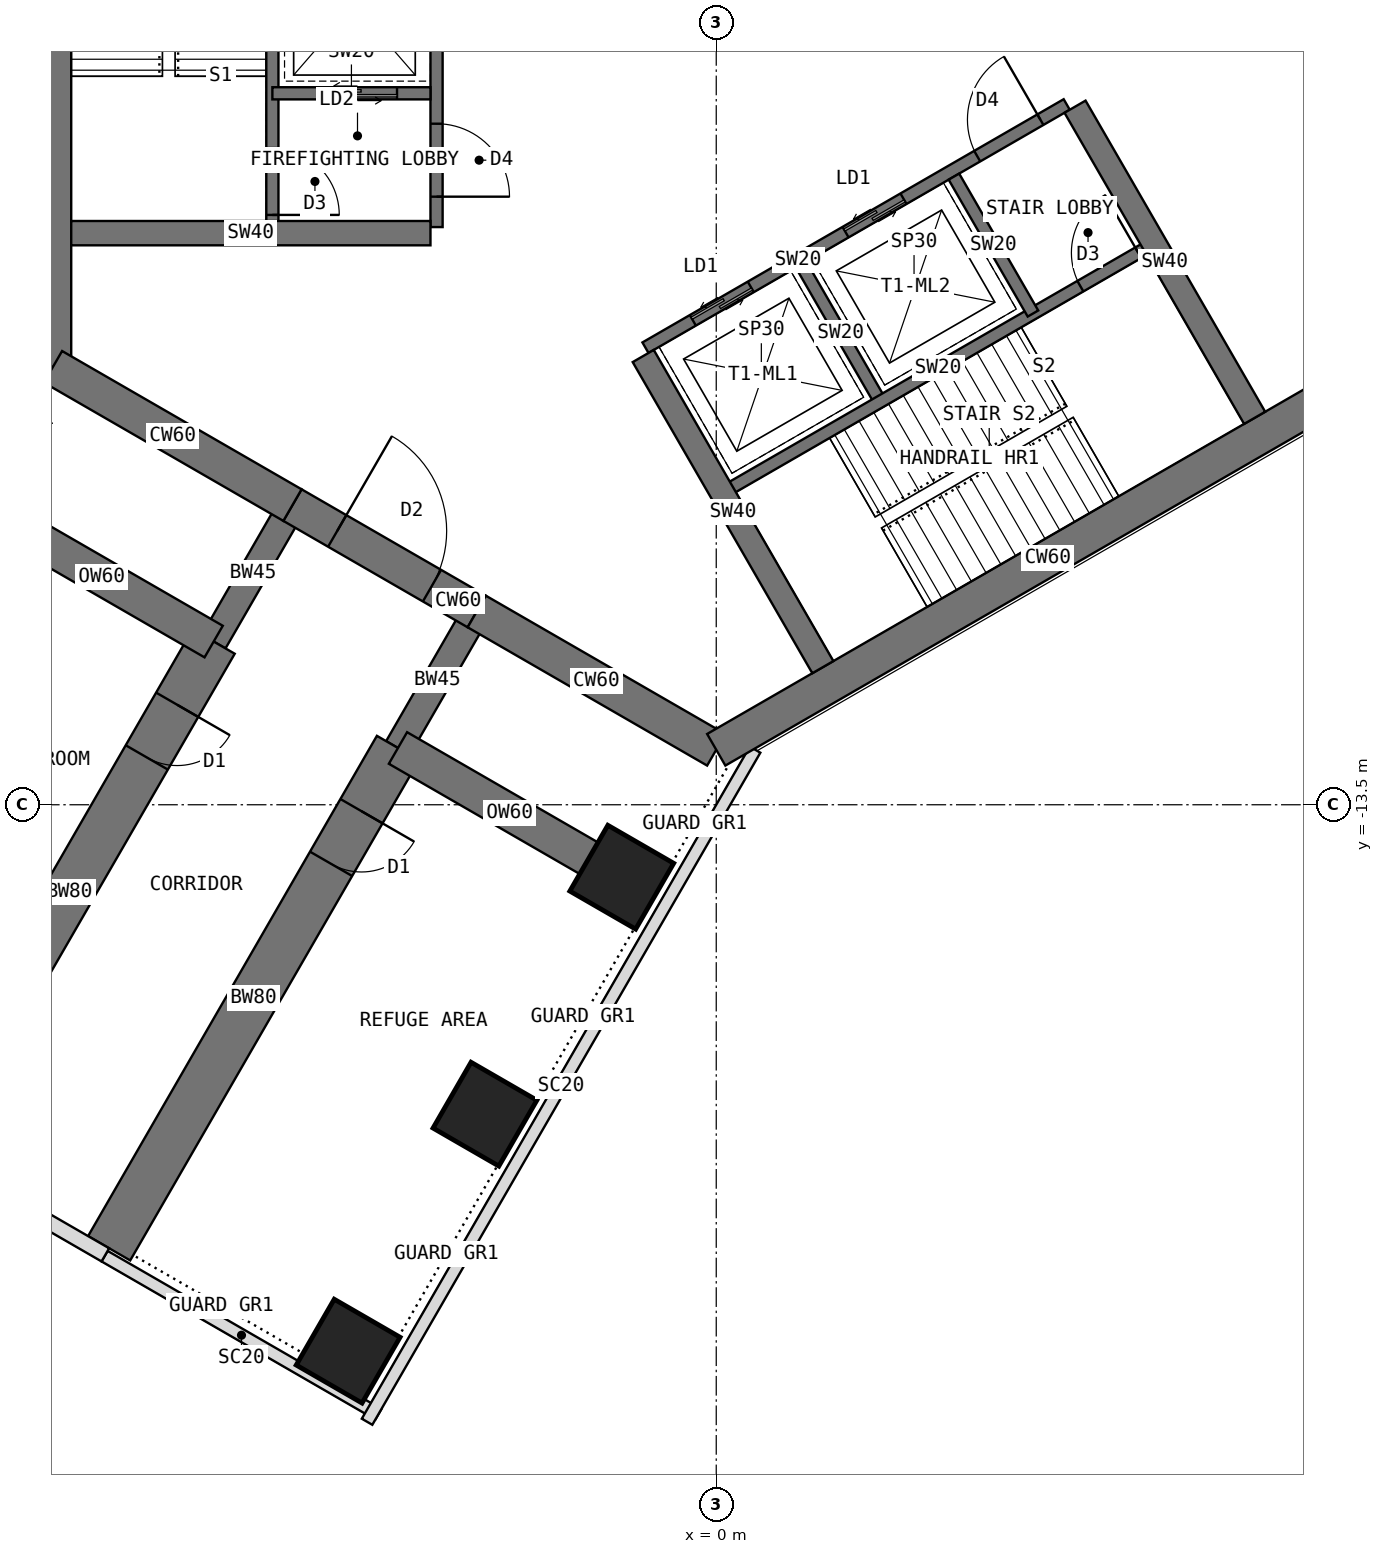
"""IFC4 building model, lengths in metres.
Left out: names, types, materials, properties, quantities, classifications, styles, units other than length and angle.
Written with IfcOpenShell. Run it as: python <this file> out.ifc"""

import sys

from ifc_helpers import new_model, si_unit, direction, frame, frame_2d, origin, origin_2d, place, context, subcontext, project, spatial, rectangle, extrude, element, fill, save


model = new_model("IFC4")
c1 = context("Model", 3, precision=1e-05, world=origin(), true_north=direction((0.0, 1.0)))
c2 = subcontext(c1, "Body", "Model", "MODEL_VIEW")
j1 = project(units=[si_unit("LENGTHUNIT", "METRE"), si_unit("PLANEANGLEUNIT", "RADIAN")], contexts=[c1])
p1 = place(None, origin())
s1 = spatial("IfcSite", under=j1, at=p1, CompositionType="ELEMENT")
p2 = place(p1, origin())
s2 = spatial("IfcBuilding", under=s1, at=p2, CompositionType="ELEMENT")
p3 = place(p2, frame((0.0, 0.0, 165.5)))
s3 = spatial("IfcBuildingStorey", under=s2, at=p3, CompositionType="ELEMENT", Elevation=165.5)
p4 = place(p3, frame((-10.908, 6.298, 0.0), z_axis=(0.0, 0.0, 1.0), x_axis=(0.0, -1.0, 0.0)))
e1 = element("IfcWall", 1, at=p4, inside=s3, PredefinedType="SHEAR", context=c2, shape_type="SweptSolid", body=[
    extrude(rectangle(XDim=12.596, YDim=0.6, at=frame_2d((6.298, 0.0))), origin(), (0.0, 0.0, 1.0), 5.0),
])
p5 = place(p3, frame((-10.908, -6.298, 0.0), z_axis=(0.0, 0.0, 1.0), x_axis=(0.866034513004, -0.499984222037, 0.0)))
e2 = element("IfcWall", 2, at=p5, inside=s3, PredefinedType="SHEAR", context=c2, shape_type="SweptSolid", body=[
    extrude(rectangle(XDim=4.548, YDim=0.6, at=frame_2d((2.274, 0.0))), origin(), (0.0, 0.0, 1.0), 5.0),
])
p6 = place(p3, frame((-6.97, -8.572, 0.0), z_axis=(0.0, 0.0, 1.0), x_axis=(0.866019471182, -0.500010275428, 0.0)))
e3 = element("IfcWall", 3, at=p6, inside=s3, PredefinedType="SHEAR", context=c2, shape_type="SweptSolid", body=[
    extrude(rectangle(XDim=3.5, YDim=0.6, at=frame_2d((1.75, 0.0))), origin(), (0.0, 0.0, 1.0), 5.0),
])
p7 = place(p6, frame((0.85, 0.0, 0.0)))
e4 = element("IfcOpeningElement", 4, at=p7, cuts=e3, PredefinedType="OPENING", context=c2, shape_type="SweptSolid", body=[
    extrude(rectangle(XDim=1.8, YDim=2.1, at=frame_2d((0.9, 1.05))), frame((0.0, 0.31, 0.0), z_axis=(0.0, -1.0, 0.0), x_axis=(1.0, 0.0, 0.0)), (0.0, 0.0, 1.0), 0.62),
])
p8 = place(p3, frame((-3.939, -10.322, 0.0), z_axis=(0.0, 0.0, 1.0), x_axis=(0.866011268655, -0.500024481964, 0.0)))
e5 = element("IfcWall", 5, at=p8, inside=s3, PredefinedType="SHEAR", context=c2, shape_type="SweptSolid", body=[
    extrude(rectangle(XDim=4.548, YDim=0.6, at=frame_2d((2.274, 0.0))), origin(), (0.0, 0.0, 1.0), 5.0),
])
p9 = place(p3, frame((0.0, -12.596, 0.0), z_axis=(0.0, 0.0, 1.0), x_axis=(0.866021940709, 0.500005998175, 0.0)))
e6 = element("IfcWall", 6, at=p9, inside=s3, PredefinedType="SHEAR", context=c2, shape_type="SweptSolid", body=[
    extrude(rectangle(XDim=12.596, YDim=0.6, at=frame_2d((6.298, 0.0))), origin(), (0.0, 0.0, 1.0), 5.0),
])
p10 = place(p3, frame((-3.939, -10.322, 0.0), z_axis=(0.0, 0.0, 1.0), x_axis=(-0.499918158782, -0.866072649678, 0.0)))
e7 = element("IfcWall", 7, at=p10, inside=s3, PredefinedType="SHEAR", context=c2, shape_type="SweptSolid", body=[
    extrude(rectangle(XDim=2.592, YDim=0.45, at=frame_2d((1.296, 0.0))), origin(), (0.0, 0.0, 1.0), 5.0),
])
p11 = place(p3, frame((-5.234, -12.566, 0.0), z_axis=(0.0, 0.0, 1.0), x_axis=(-0.499997557548, -0.86602681393, 0.0)))
e8 = element("IfcWall", 8, at=p11, inside=s3, PredefinedType="SHEAR", context=c2, shape_type="SweptSolid", body=[
    extrude(rectangle(XDim=9.5, YDim=0.8, at=frame_2d((4.75, 0.0))), origin(), (0.0, 0.0, 1.0), 5.0),
])
p12 = place(p11, frame((1.2, 0.0, 0.0)))
e9 = element("IfcOpeningElement", 9, at=p12, cuts=e8, PredefinedType="OPENING", context=c2, shape_type="SweptSolid", body=[
    extrude(rectangle(XDim=1.0, YDim=2.1, at=frame_2d((0.5, 1.05))), frame((0.0, 0.41, 0.0), z_axis=(0.0, -1.0, 0.0), x_axis=(1.0, 0.0, 0.0)), (0.0, 0.0, 1.0), 0.82),
])
p13 = place(p3, frame((-6.97, -8.572, 0.0), z_axis=(0.0, 0.0, 1.0), x_axis=(-0.499988811324, -0.866031863473, 0.0)))
e10 = element("IfcWall", 10, at=p13, inside=s3, PredefinedType="SHEAR", context=c2, shape_type="SweptSolid", body=[
    extrude(rectangle(XDim=2.592, YDim=0.45, at=frame_2d((1.296, 0.0))), origin(), (0.0, 0.0, 1.0), 5.0),
])
p14 = place(p3, frame((-8.266, -10.816, 0.0), z_axis=(0.0, 0.0, 1.0), x_axis=(-0.499997557548, -0.86602681393, 0.0)))
e11 = element("IfcWall", 11, at=p14, inside=s3, PredefinedType="SHEAR", context=c2, shape_type="SweptSolid", body=[
    extrude(rectangle(XDim=9.5, YDim=0.8, at=frame_2d((4.75, 0.0))), origin(), (0.0, 0.0, 1.0), 5.0),
])
p15 = place(p14, frame((1.2, 0.0, 0.0)))
e12 = element("IfcOpeningElement", 12, at=p15, cuts=e11, PredefinedType="OPENING", context=c2, shape_type="SweptSolid", body=[
    extrude(rectangle(XDim=1.0, YDim=2.1, at=frame_2d((0.5, 1.05))), frame((0.0, 0.41, 0.0), z_axis=(0.0, -1.0, 0.0), x_axis=(1.0, 0.0, 0.0)), (0.0, 0.0, 1.0), 0.82),
])
for number, where, z_axis, x_axis in (
    (13, (-1.554, -14.691, 0.0), (0.0, 0.0, 1.0), (0.5, 0.866, 0.0)),
    (14, (-3.804, -18.588, 0.0), (0.0, 0.0, 1.0), (0.5, 0.866, 0.0)),
    (15, (-6.054, -22.486, 0.0), (0.0, 0.0, 1.0), (0.5, 0.866, 0.0)),
):
    element("IfcColumn", number, at=place(p3, frame(where, z_axis=z_axis, x_axis=x_axis)), inside=s3, PredefinedType="COLUMN", context=c2, shape_type="SweptSolid", body=[
        extrude(rectangle(XDim=1.25, YDim=1.25, at=origin_2d()), origin(), (0.0, 0.0, 1.0), 5.0),
    ])
for number, where, z_axis, x_axis in (
    (16, (-5.234, -12.566, 0.0), (0.0, 0.0, 1.0), (0.866, -0.5, 0.0)),
    (17, (-8.266, -10.816, 0.0), (0.0, 0.0, 1.0), (-0.866, 0.5, 0.0)),
):
    element("IfcWall", number, at=place(p3, frame(where, z_axis=z_axis, x_axis=x_axis)), inside=s3, PredefinedType="SHEAR", context=c2, shape_type="SweptSolid", body=[
        extrude(rectangle(XDim=4.25, YDim=0.6, at=frame_2d((2.125, 0.0))), origin(), (0.0, 0.0, 1.0), 5.0),
    ])
p16 = place(p3, frame((0.639, -12.594, 0.0), z_axis=(0.0, 0.0, 1.0), x_axis=(-0.499994566336, -0.866028540889, 0.0)))
e18 = element("IfcWall", 18, at=p16, inside=s3, PredefinedType="USERDEFINED", context=c2, shape_type="SweptSolid", body=[
    extrude(rectangle(XDim=12.763, YDim=0.2, at=frame_2d((6.381, 0.0))), origin(), (0.0, 0.0, 1.0), 4.8),
])
p17 = place(p3, frame((-13.078, -19.152, 0.0), z_axis=(0.0, 0.0, 1.0), x_axis=(0.866036909293, -0.499980071345, 0.0)))
e19 = element("IfcWall", 19, at=p17, inside=s3, PredefinedType="STANDARD", context=c2, shape_type="SweptSolid", body=[
    extrude(rectangle(XDim=3.5, YDim=0.25, at=frame_2d((1.75, 0.0))), origin(), (0.0, 0.0, 1.0), 4.8),
])
p18 = place(p3, frame((-10.06, -20.924, 0.0), z_axis=(0.0, 0.0, 1.0), x_axis=(0.866041729639, -0.499971721724, 0.0)))
e20 = element("IfcWall", 20, at=p18, inside=s3, PredefinedType="USERDEFINED", context=c2, shape_type="SweptSolid", body=[
    extrude(rectangle(XDim=5.2, YDim=0.2, at=frame_2d((2.6, 0.0))), origin(), (0.0, 0.0, 1.0), 4.8),
])
p19 = place(p3, frame((-4.6, 4.0, 0.0), z_axis=(0.0, 0.0, 1.0), x_axis=(0.0, -1.0, 0.0)))
e21 = element("IfcWall", 21, at=p19, inside=s3, PredefinedType="SHEAR", context=c2, shape_type="SweptSolid", body=[
    extrude(rectangle(XDim=8.0, YDim=0.2, at=frame_2d((4.0, 0.0))), origin(), (0.0, 0.0, 1.0), 5.0),
])
p20 = place(p19, frame((6.3, 0.0, 0.0)))
e22 = element("IfcOpeningElement", 22, at=p20, cuts=e21, PredefinedType="OPENING", context=c2, shape_type="SweptSolid", body=[
    extrude(rectangle(XDim=1.2, YDim=2.1, at=frame_2d((0.6, 1.05))), frame((0.0, 0.11, 0.0), z_axis=(0.0, -1.0, 0.0), x_axis=(1.0, 0.0, 0.0)), (0.0, 0.0, 1.0), 0.22),
])
p21 = place(p19, frame((0.9, 0.0, 0.0)))
e23 = element("IfcOpeningElement", 23, at=p21, cuts=e21, PredefinedType="OPENING", context=c2, shape_type="SweptSolid", body=[
    extrude(rectangle(XDim=1.1, YDim=2.2, at=frame_2d((0.55, 1.1))), frame((0.0, 0.11, 0.0), z_axis=(0.0, -1.0, 0.0), x_axis=(1.0, 0.0, 0.0)), (0.0, 0.0, 1.0), 0.22),
])
p22 = place(p3, frame((-4.7, -1.8, 0.0), z_axis=(0.0, 0.0, 1.0), x_axis=(-1.0, 0.0, 0.0)))
e24 = element("IfcWall", 24, at=p22, inside=s3, PredefinedType="SHEAR", context=c2, shape_type="SweptSolid", body=[
    extrude(rectangle(XDim=2.6, YDim=0.2, at=frame_2d((1.3, 0.0))), origin(), (0.0, 0.0, 1.0), 5.0),
])
p23 = place(p22, frame((0.55, 0.0, 0.0)))
e25 = element("IfcOpeningElement", 25, at=p23, cuts=e24, PredefinedType="OPENING", context=c2, shape_type="SweptSolid", body=[
    extrude(rectangle(XDim=1.3, YDim=2.2, at=frame_2d((0.65, 1.1))), frame((0.0, 0.11, 0.0), z_axis=(0.0, -1.0, 0.0), x_axis=(1.0, 0.0, 0.0)), (0.0, 0.0, 1.0), 0.22),
])
p24 = place(p3, frame((-7.3, 4.0, 0.0), z_axis=(0.0, 0.0, 1.0), x_axis=(0.0, -1.0, 0.0)))
e26 = element("IfcWall", 26, at=p24, inside=s3, PredefinedType="SHEAR", context=c2, shape_type="SweptSolid", body=[
    extrude(rectangle(XDim=8.0, YDim=0.2, at=frame_2d((4.0, 0.0))), origin(), (0.0, 0.0, 1.0), 5.0),
])
p25 = place(p24, frame((6.7, 0.0, 0.0)))
e27 = element("IfcOpeningElement", 27, at=p25, cuts=e26, PredefinedType="OPENING", context=c2, shape_type="SweptSolid", body=[
    extrude(rectangle(XDim=1.1, YDim=2.1, at=frame_2d((0.55, 1.05))), frame((0.0, 0.11, 0.0), z_axis=(0.0, -1.0, 0.0), x_axis=(1.0, 0.0, 0.0)), (0.0, 0.0, 1.0), 0.22),
])
p26 = place(p3, frame((-4.7, -4.1, 0.0), z_axis=(0.0, 0.0, 1.0), x_axis=(-1.0, 0.0, 0.0)))
e28 = element("IfcWall", 28, at=p26, inside=s3, PredefinedType="SHEAR", context=c2, shape_type="SweptSolid", body=[
    extrude(rectangle(XDim=5.908, YDim=0.4, at=frame_2d((2.954, 0.0))), origin(), (0.0, 0.0, 1.0), 5.0),
])
p27 = place(p3, frame((-1.164, -5.984, 0.0), z_axis=(0.0, 0.0, 1.0), x_axis=(0.866026010844, 0.49999894854, 0.0)))
e29 = element("IfcWall", 29, at=p27, inside=s3, PredefinedType="SHEAR", context=c2, shape_type="SweptSolid", body=[
    extrude(rectangle(XDim=8.0, YDim=0.2, at=frame_2d((4.0, 0.0))), origin(), (0.0, 0.0, 1.0), 5.0),
])
p28 = place(p27, frame((6.3, 0.0, 0.0)))
e30 = element("IfcOpeningElement", 30, at=p28, cuts=e29, PredefinedType="OPENING", context=c2, shape_type="SweptSolid", body=[
    extrude(rectangle(XDim=1.2, YDim=2.1, at=frame_2d((0.6, 1.05))), frame((0.0, 0.11, 0.0), z_axis=(0.0, -1.0, 0.0), x_axis=(1.0, 0.0, 0.0)), (0.0, 0.0, 1.0), 0.22),
])
p29 = place(p27, frame((0.9, 0.0, 0.0)))
e31 = element("IfcOpeningElement", 31, at=p29, cuts=e29, PredefinedType="OPENING", context=c2, shape_type="SweptSolid", body=[
    extrude(rectangle(XDim=1.1, YDim=2.2, at=frame_2d((0.55, 1.1))), frame((0.0, 0.11, 0.0), z_axis=(0.0, -1.0, 0.0), x_axis=(1.0, 0.0, 0.0)), (0.0, 0.0, 1.0), 0.22),
])
p30 = place(p27, frame((3.8, 0.0, 0.0)))
e32 = element("IfcOpeningElement", 32, at=p30, cuts=e29, PredefinedType="OPENING", context=c2, shape_type="SweptSolid", body=[
    extrude(rectangle(XDim=1.1, YDim=2.2, at=frame_2d((0.55, 1.1))), frame((0.0, 0.11, 0.0), z_axis=(0.0, -1.0, 0.0), x_axis=(1.0, 0.0, 0.0)), (0.0, 0.0, 1.0), 0.22),
])
p31 = place(p3, frame((1.397, -4.62, 0.0), z_axis=(0.0, 0.0, 1.0), x_axis=(0.499936506574, -0.866062058628, 0.0)))
e33 = element("IfcWall", 33, at=p31, inside=s3, PredefinedType="SHEAR", context=c2, shape_type="SweptSolid", body=[
    extrude(rectangle(XDim=2.6, YDim=0.2, at=frame_2d((1.3, 0.0))), origin(), (0.0, 0.0, 1.0), 5.0),
])
p32 = place(p3, frame((3.909, -3.17, 0.0), z_axis=(0.0, 0.0, 1.0), x_axis=(0.49997716683, -0.86603858612, 0.0)))
e34 = element("IfcWall", 34, at=p32, inside=s3, PredefinedType="SHEAR", context=c2, shape_type="SweptSolid", body=[
    extrude(rectangle(XDim=2.6, YDim=0.2, at=frame_2d((1.3, 0.0))), origin(), (0.0, 0.0, 1.0), 5.0),
])
p33 = place(p3, frame((0.186, -8.322, 0.0), z_axis=(0.0, 0.0, 1.0), x_axis=(0.866026010844, 0.49999894854, 0.0)))
e35 = element("IfcWall", 35, at=p33, inside=s3, PredefinedType="SHEAR", context=c2, shape_type="SweptSolid", body=[
    extrude(rectangle(XDim=8.0, YDim=0.2, at=frame_2d((4.0, 0.0))), origin(), (0.0, 0.0, 1.0), 5.0),
])
p34 = place(p33, frame((6.7, 0.0, 0.0)))
e36 = element("IfcOpeningElement", 36, at=p34, cuts=e35, PredefinedType="OPENING", context=c2, shape_type="SweptSolid", body=[
    extrude(rectangle(XDim=1.1, YDim=2.1, at=frame_2d((0.55, 1.05))), frame((0.0, 0.11, 0.0), z_axis=(0.0, -1.0, 0.0), x_axis=(1.0, 0.0, 0.0)), (0.0, 0.0, 1.0), 0.22),
])
p35 = place(p3, frame((5.901, -2.02, 0.0), z_axis=(0.0, 0.0, 1.0), x_axis=(0.500027676417, -0.866009424208, 0.0)))
e37 = element("IfcWall", 37, at=p35, inside=s3, PredefinedType="SHEAR", context=c2, shape_type="SweptSolid", body=[
    extrude(rectangle(XDim=5.908, YDim=0.4, at=frame_2d((2.954, 0.0))), origin(), (0.0, 0.0, 1.0), 5.0),
])
p36 = place(p3, frame((-1.201, -6.12, 0.0), z_axis=(0.0, 0.0, 1.0), x_axis=(0.49999668571, -0.866027317282, 0.0)))
e38 = element("IfcWall", 38, at=p36, inside=s3, PredefinedType="SHEAR", context=c2, shape_type="SweptSolid", body=[
    extrude(rectangle(XDim=5.908, YDim=0.4, at=frame_2d((2.954, 0.0))), origin(), (0.0, 0.0, 1.0), 5.0),
])
p37 = place(p20, origin())
e39 = element("IfcDoor", 39, at=p37, inside=s3, OperationType="SINGLE_SWING_RIGHT", PredefinedType="DOOR", context=c2, shape_type="SweptSolid", body=[
    extrude(rectangle(XDim=1.2, YDim=2.1, at=frame_2d((0.6, 1.05))), frame((0.0, 0.025, 0.0), z_axis=(0.0, -1.0, 0.0), x_axis=(1.0, 0.0, 0.0)), (0.0, 0.0, 1.0), 0.05),
])
fill(e22, e39)
p38 = place(p23, origin())
e40 = element("IfcDoor", 40, at=p38, inside=s3, OperationType="DOUBLE_DOOR_SLIDING", PredefinedType="DOOR", context=c2, shape_type="SweptSolid", body=[
    extrude(rectangle(XDim=1.3, YDim=2.2, at=frame_2d((0.65, 1.1))), frame((0.0, 0.025, 0.0), z_axis=(0.0, -1.0, 0.0), x_axis=(1.0, 0.0, 0.0)), (0.0, 0.0, 1.0), 0.05),
])
fill(e25, e40)
p39 = place(p25, origin())
e41 = element("IfcDoor", 41, at=p39, inside=s3, OperationType="SINGLE_SWING_RIGHT", PredefinedType="DOOR", context=c2, shape_type="SweptSolid", body=[
    extrude(rectangle(XDim=1.1, YDim=2.1, at=frame_2d((0.55, 1.05))), frame((0.0, 0.025, 0.0), z_axis=(0.0, -1.0, 0.0), x_axis=(1.0, 0.0, 0.0)), (0.0, 0.0, 1.0), 0.05),
])
fill(e27, e41)
p40 = place(p28, origin())
e42 = element("IfcDoor", 42, at=p40, inside=s3, OperationType="SINGLE_SWING_RIGHT", PredefinedType="DOOR", context=c2, shape_type="SweptSolid", body=[
    extrude(rectangle(XDim=1.2, YDim=2.1, at=frame_2d((0.6, 1.05))), frame((0.0, 0.025, 0.0), z_axis=(0.0, -1.0, 0.0), x_axis=(1.0, 0.0, 0.0)), (0.0, 0.0, 1.0), 0.05),
])
fill(e30, e42)
p41 = place(p29, origin())
e43 = element("IfcDoor", 43, at=p41, inside=s3, OperationType="DOUBLE_DOOR_SLIDING", PredefinedType="DOOR", context=c2, shape_type="SweptSolid", body=[
    extrude(rectangle(XDim=1.1, YDim=2.2, at=frame_2d((0.55, 1.1))), frame((0.0, 0.025, 0.0), z_axis=(0.0, -1.0, 0.0), x_axis=(1.0, 0.0, 0.0)), (0.0, 0.0, 1.0), 0.05),
])
fill(e31, e43)
p42 = place(p30, origin())
e44 = element("IfcDoor", 44, at=p42, inside=s3, OperationType="DOUBLE_DOOR_SLIDING", PredefinedType="DOOR", context=c2, shape_type="SweptSolid", body=[
    extrude(rectangle(XDim=1.1, YDim=2.2, at=frame_2d((0.55, 1.1))), frame((0.0, 0.025, 0.0), z_axis=(0.0, -1.0, 0.0), x_axis=(1.0, 0.0, 0.0)), (0.0, 0.0, 1.0), 0.05),
])
fill(e32, e44)
p43 = place(p34, origin())
e45 = element("IfcDoor", 45, at=p43, inside=s3, OperationType="SINGLE_SWING_RIGHT", PredefinedType="DOOR", context=c2, shape_type="SweptSolid", body=[
    extrude(rectangle(XDim=1.1, YDim=2.1, at=frame_2d((0.55, 1.05))), frame((0.0, 0.025, 0.0), z_axis=(0.0, -1.0, 0.0), x_axis=(1.0, 0.0, 0.0)), (0.0, 0.0, 1.0), 0.05),
])
fill(e36, e45)
p44 = place(p7, origin())
e46 = element("IfcDoor", 46, at=p44, inside=s3, OperationType="DOUBLE_DOOR_DOUBLE_SWING", PredefinedType="DOOR", context=c2, shape_type="SweptSolid", body=[
    extrude(rectangle(XDim=1.72, YDim=2.06, at=frame_2d((0.9, 1.03))), frame((0.0, 0.025, 0.0), z_axis=(0.0, -1.0, 0.0), x_axis=(1.0, 0.0, 0.0)), (0.0, 0.0, 1.0), 0.05),
    extrude(rectangle(XDim=0.04, YDim=2.1, at=frame_2d((0.02, 1.05))), frame((0.0, 0.3, 0.0), z_axis=(0.0, -1.0, 0.0), x_axis=(1.0, 0.0, 0.0)), (0.0, 0.0, 1.0), 0.6),
    extrude(rectangle(XDim=0.04, YDim=2.1, at=frame_2d((1.78, 1.05))), frame((0.0, 0.3, 0.0), z_axis=(0.0, -1.0, 0.0), x_axis=(1.0, 0.0, 0.0)), (0.0, 0.0, 1.0), 0.6),
    extrude(rectangle(XDim=1.72, YDim=0.04, at=frame_2d((0.9, 2.08))), frame((0.0, 0.3, 0.0), z_axis=(0.0, -1.0, 0.0), x_axis=(1.0, 0.0, 0.0)), (0.0, 0.0, 1.0), 0.6),
])
fill(e4, e46)
p45 = place(p12, origin())
e47 = element("IfcDoor", 47, at=p45, inside=s3, OperationType="SINGLE_SWING_LEFT", PredefinedType="DOOR", context=c2, shape_type="SweptSolid", body=[
    extrude(rectangle(XDim=0.92, YDim=2.06, at=frame_2d((0.5, 1.03))), frame((0.0, 0.025, 0.0), z_axis=(0.0, -1.0, 0.0), x_axis=(1.0, 0.0, 0.0)), (0.0, 0.0, 1.0), 0.05),
    extrude(rectangle(XDim=0.04, YDim=2.1, at=frame_2d((0.02, 1.05))), frame((0.0, 0.4, 0.0), z_axis=(0.0, -1.0, 0.0), x_axis=(1.0, 0.0, 0.0)), (0.0, 0.0, 1.0), 0.8),
    extrude(rectangle(XDim=0.04, YDim=2.1, at=frame_2d((0.98, 1.05))), frame((0.0, 0.4, 0.0), z_axis=(0.0, -1.0, 0.0), x_axis=(1.0, 0.0, 0.0)), (0.0, 0.0, 1.0), 0.8),
    extrude(rectangle(XDim=0.92, YDim=0.04, at=frame_2d((0.5, 2.08))), frame((0.0, 0.4, 0.0), z_axis=(0.0, -1.0, 0.0), x_axis=(1.0, 0.0, 0.0)), (0.0, 0.0, 1.0), 0.8),
])
fill(e9, e47)
p46 = place(p15, origin())
e48 = element("IfcDoor", 48, at=p46, inside=s3, OperationType="SINGLE_SWING_LEFT", PredefinedType="DOOR", context=c2, shape_type="SweptSolid", body=[
    extrude(rectangle(XDim=0.92, YDim=2.06, at=frame_2d((0.5, 1.03))), frame((0.0, 0.025, 0.0), z_axis=(0.0, -1.0, 0.0), x_axis=(1.0, 0.0, 0.0)), (0.0, 0.0, 1.0), 0.05),
    extrude(rectangle(XDim=0.04, YDim=2.1, at=frame_2d((0.02, 1.05))), frame((0.0, 0.4, 0.0), z_axis=(0.0, -1.0, 0.0), x_axis=(1.0, 0.0, 0.0)), (0.0, 0.0, 1.0), 0.8),
    extrude(rectangle(XDim=0.04, YDim=2.1, at=frame_2d((0.98, 1.05))), frame((0.0, 0.4, 0.0), z_axis=(0.0, -1.0, 0.0), x_axis=(1.0, 0.0, 0.0)), (0.0, 0.0, 1.0), 0.8),
    extrude(rectangle(XDim=0.92, YDim=0.04, at=frame_2d((0.5, 2.08))), frame((0.0, 0.4, 0.0), z_axis=(0.0, -1.0, 0.0), x_axis=(1.0, 0.0, 0.0)), (0.0, 0.0, 1.0), 0.8),
])
fill(e12, e48)
save(model, sys.argv[1])
